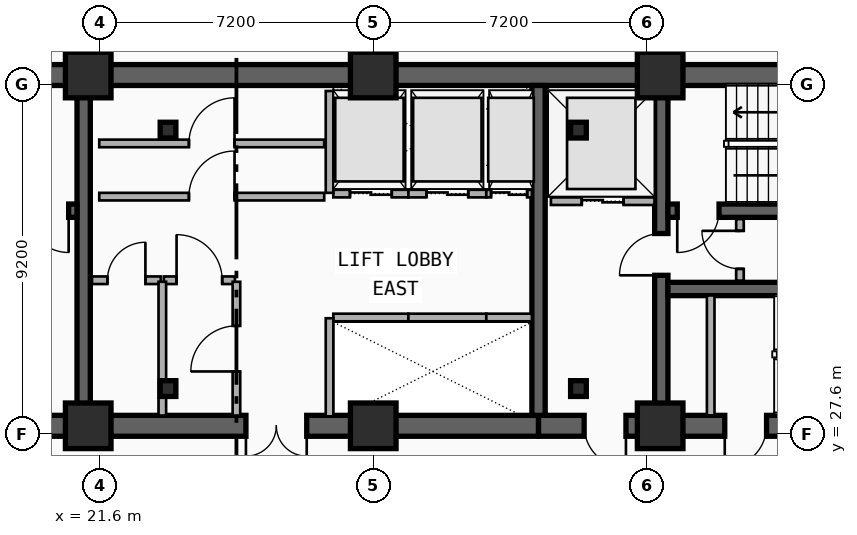
"""IFC4 building model, lengths in metres.
Left out: names, types, materials, properties, quantities, classifications, styles, units other than length and angle.
Written with IfcOpenShell. Run it as: python <this file> out.ifc"""

import sys

from ifc_helpers import new_model, si_unit, direction, frame, frame_2d, origin, origin_2d, place, context, subcontext, project, spatial, rectangle, i_section, extrude, element, fill, save


model = new_model("IFC4")
c1 = context("Model", 3, precision=1e-05, world=origin(), true_north=direction((0.0, 1.0)))
c2 = subcontext(c1, "Body", "Model", "MODEL_VIEW")
j1 = project(units=[si_unit("LENGTHUNIT", "METRE"), si_unit("PLANEANGLEUNIT", "RADIAN")], contexts=[c1])
p1 = place(None, origin())
s1 = spatial("IfcSite", under=j1, at=p1, CompositionType="ELEMENT")
p2 = place(p1, origin())
s2 = spatial("IfcBuilding", under=s1, at=p2, CompositionType="ELEMENT")
p3 = place(p2, frame((0.0, 0.0, 162.55)))
s3 = spatial("IfcBuildingStorey", under=s2, at=p3, CompositionType="ELEMENT", Elevation=162.55)
p4 = place(p3, frame((12.15, 37.05, 0.0), z_axis=(0.0, 0.0, 1.0), x_axis=(1.0, 0.0, 0.0)))
e1 = element("IfcWall", 1, at=p4, inside=s3, PredefinedType="SHEAR", context=c2, shape_type="SweptSolid", body=[
    extrude(rectangle(XDim=33.23, YDim=0.55, at=frame_2d((16.615, 0.0))), origin(), (0.0, 0.0, 1.0), 3.55),
])
p5 = place(p3, frame((21.18, 27.82, 0.0), z_axis=(0.0, 0.0, 1.0), x_axis=(-1.0, 0.0, 0.0)))
e2 = element("IfcWall", 2, at=p5, inside=s3, PredefinedType="SHEAR", context=c2, shape_type="SweptSolid", body=[
    extrude(rectangle(XDim=9.03, YDim=0.55, at=frame_2d((4.515, 0.0))), origin(), (0.0, 0.0, 1.0), 3.55),
])
p6 = place(p5, frame((2.68, 0.0, 0.0)))
e3 = element("IfcOpeningElement", 3, at=p6, cuts=e2, PredefinedType="OPENING", context=c2, shape_type="SweptSolid", body=[
    extrude(rectangle(XDim=1.1, YDim=2.15, at=frame_2d((0.55, 1.075))), frame((0.0, 0.285, 0.0), z_axis=(0.0, -1.0, 0.0), x_axis=(1.0, 0.0, 0.0)), (0.0, 0.0, 1.0), 0.57),
])
p7 = place(p3, frame((33.15, 27.82, 0.0), z_axis=(0.0, 0.0, 1.0), x_axis=(-1.0, 0.0, 0.0)))
e4 = element("IfcWall", 4, at=p7, inside=s3, PredefinedType="SHEAR", context=c2, shape_type="SweptSolid", body=[
    extrude(rectangle(XDim=11.97, YDim=0.55, at=frame_2d((5.985, 0.0))), origin(), (0.0, 0.0, 1.0), 3.55),
])
p8 = place(p7, frame((6.1, 0.0, 0.0)))
e5 = element("IfcOpeningElement", 5, at=p8, cuts=e4, PredefinedType="OPENING", context=c2, shape_type="SweptSolid", body=[
    extrude(rectangle(XDim=1.6, YDim=2.2, at=frame_2d((0.8, 1.1))), frame((0.0, 0.285, 0.0), z_axis=(0.0, -1.0, 0.0), x_axis=(1.0, 0.0, 0.0)), (0.0, 0.0, 1.0), 0.57),
])
p9 = place(p3, frame((45.38, 27.82, 0.0), z_axis=(0.0, 0.0, 1.0), x_axis=(-1.0, 0.0, 0.0)))
e6 = element("IfcWall", 6, at=p9, inside=s3, PredefinedType="SHEAR", context=c2, shape_type="SweptSolid", body=[
    extrude(rectangle(XDim=12.23, YDim=0.55, at=frame_2d((6.115, 0.0))), origin(), (0.0, 0.0, 1.0), 3.55),
])
p10 = place(p9, frame((9.93, 0.0, 0.0)))
e7 = element("IfcOpeningElement", 7, at=p10, cuts=e6, PredefinedType="OPENING", context=c2, shape_type="SweptSolid", body=[
    extrude(rectangle(XDim=1.1, YDim=2.15, at=frame_2d((0.55, 1.075))), frame((0.0, 0.285, 0.0), z_axis=(0.0, -1.0, 0.0), x_axis=(1.0, 0.0, 0.0)), (0.0, 0.0, 1.0), 0.57),
])
p11 = place(p9, frame((6.23, 0.0, 0.0)))
e8 = element("IfcOpeningElement", 8, at=p11, cuts=e6, PredefinedType="OPENING", context=c2, shape_type="SweptSolid", body=[
    extrude(rectangle(XDim=1.1, YDim=2.15, at=frame_2d((0.55, 1.075))), frame((0.0, 0.285, 0.0), z_axis=(0.0, -1.0, 0.0), x_axis=(1.0, 0.0, 0.0)), (0.0, 0.0, 1.0), 0.57),
])
for number, where, z_axis, x_axis in (
    (9, (21.18, 28.095, 0.0), (0.0, 0.0, 1.0), (0.0, 1.0, 0.0)),
    (10, (33.15, 28.095, 0.0), (0.0, 0.0, 1.0), (0.0, 1.0, 0.0)),
):
    element("IfcWall", number, at=place(p3, frame(where, z_axis=z_axis, x_axis=x_axis)), inside=s3, PredefinedType="SHEAR", context=c2, shape_type="SweptSolid", body=[
        extrude(rectangle(XDim=8.68, YDim=0.35, at=frame_2d((4.34, 0.0))), origin(), (0.0, 0.0, 1.0), 3.55),
    ])
p12 = place(p3, frame((36.38, 28.095, 0.0), z_axis=(0.0, 0.0, 1.0), x_axis=(0.0, 1.0, 0.0)))
e11 = element("IfcWall", 11, at=p12, inside=s3, PredefinedType="SHEAR", context=c2, shape_type="SweptSolid", body=[
    extrude(rectangle(XDim=8.68, YDim=0.35, at=frame_2d((4.34, 0.0))), origin(), (0.0, 0.0, 1.0), 3.55),
])
p13 = place(p12, frame((3.685, 0.0, 0.0)))
e12 = element("IfcOpeningElement", 12, at=p13, cuts=e11, PredefinedType="OPENING", context=c2, shape_type="SweptSolid", body=[
    extrude(rectangle(XDim=1.1, YDim=2.15, at=frame_2d((0.55, 1.075))), frame((0.0, 0.185, 0.0), z_axis=(0.0, -1.0, 0.0), x_axis=(1.0, 0.0, 0.0)), (0.0, 0.0, 1.0), 0.37),
])
p14 = place(p3, frame((21.005, 33.48, 0.0), z_axis=(0.0, 0.0, 1.0), x_axis=(-1.0, 0.0, 0.0)))
e13 = element("IfcWall", 13, at=p14, inside=s3, PredefinedType="SHEAR", context=c2, shape_type="SweptSolid", body=[
    extrude(rectangle(XDim=8.58, YDim=0.35, at=frame_2d((4.29, 0.0))), origin(), (0.0, 0.0, 1.0), 3.55),
])
p15 = place(p14, frame((0.22, 0.0, 0.0)))
e14 = element("IfcOpeningElement", 14, at=p15, cuts=e13, PredefinedType="OPENING", context=c2, shape_type="SweptSolid", body=[
    extrude(rectangle(XDim=1.1, YDim=2.15, at=frame_2d((0.55, 1.075))), frame((0.0, 0.185, 0.0), z_axis=(0.0, -1.0, 0.0), x_axis=(1.0, 0.0, 0.0)), (0.0, 0.0, 1.0), 0.37),
])
p16 = place(p3, frame((45.105, 33.48, 0.0), z_axis=(0.0, 0.0, 1.0), x_axis=(-1.0, 0.0, 0.0)))
e15 = element("IfcWall", 15, at=p16, inside=s3, PredefinedType="SHEAR", context=c2, shape_type="SweptSolid", body=[
    extrude(rectangle(XDim=8.55, YDim=0.35, at=frame_2d((4.275, 0.0))), origin(), (0.0, 0.0, 1.0), 3.55),
])
p17 = place(p16, frame((7.205, 0.0, 0.0)))
e16 = element("IfcOpeningElement", 16, at=p17, cuts=e15, PredefinedType="OPENING", context=c2, shape_type="SweptSolid", body=[
    extrude(rectangle(XDim=1.1, YDim=2.15, at=frame_2d((0.55, 1.075))), frame((0.0, 0.185, 0.0), z_axis=(0.0, -1.0, 0.0), x_axis=(1.0, 0.0, 0.0)), (0.0, 0.0, 1.0), 0.37),
])
p18 = place(p3, frame((36.555, 31.42, 0.0), z_axis=(0.0, 0.0, 1.0), x_axis=(1.0, 0.0, 0.0)))
e17 = element("IfcWall", 17, at=p18, inside=s3, PredefinedType="SHEAR", context=c2, shape_type="SweptSolid", body=[
    extrude(rectangle(XDim=8.55, YDim=0.35, at=frame_2d((4.275, 0.0))), origin(), (0.0, 0.0, 1.0), 3.55),
])
for number, where, z_axis, x_axis in (
    (18, (23.4, 28.8, 0.0), (0.0, 0.0, 1.0), (1.0, 0.0, 0.0)),
    (19, (34.2, 28.8, 0.0), (0.0, 0.0, 1.0), (1.0, 0.0, 0.0)),
    (20, (34.2, 35.6, 0.0), (0.0, 0.0, 1.0), (1.0, 0.0, 0.0)),
    (21, (23.4, 35.6, 0.0), (0.0, 0.0, 1.0), (1.0, 0.0, 0.0)),
):
    element("IfcColumn", number, at=place(p3, frame(where, z_axis=z_axis, x_axis=x_axis)), inside=s3, PredefinedType="COLUMN", context=c2, shape_type="SweptSolid", body=[
        extrude(i_section(OverallWidth=0.413, OverallDepth=0.415, WebThickness=0.03, FlangeThickness=0.047, FilletRadius=0.015, at=origin_2d()), origin(), (0.0, 0.0, 1.0), 3.55),
    ])
for number, where, z_axis, x_axis in (
    (22, (21.3, 27.82, 0.0), (0.0, 0.0, 1.0), (1.0, 0.0, 0.0)),
    (23, (21.3, 37.05, 0.0), (0.0, 0.0, 1.0), (1.0, 0.0, 0.0)),
    (24, (28.8, 27.82, 0.0), (0.0, 0.0, 1.0), (1.0, 0.0, 0.0)),
    (25, (28.8, 37.05, 0.0), (0.0, 0.0, 1.0), (1.0, 0.0, 0.0)),
    (26, (36.35, 27.82, 0.0), (0.0, 0.0, 1.0), (1.0, 0.0, 0.0)),
    (27, (36.35, 37.05, 0.0), (0.0, 0.0, 1.0), (1.0, 0.0, 0.0)),
):
    element("IfcColumn", number, at=place(p3, frame(where, z_axis=z_axis, x_axis=x_axis)), inside=s3, PredefinedType="COLUMN", context=c2, shape_type="SweptSolid", body=[
        extrude(rectangle(XDim=1.2, YDim=1.2, at=origin_2d()), origin(), (0.0, 0.0, 1.0), 3.55),
    ])
p19 = place(p3, frame((33.475, 33.73, 0.0), z_axis=(0.0, 0.0, 1.0), x_axis=(1.0, 0.0, 0.0)))
e28 = element("IfcWall", 28, at=p19, inside=s3, PredefinedType="PARTITIONING", context=c2, shape_type="SweptSolid", body=[
    extrude(rectangle(XDim=2.725, YDim=0.2, at=frame_2d((1.362, 0.0))), origin(), (0.0, 0.0, 1.0), 2.36),
])
p20 = place(p19, frame((0.812, 0.0, 0.0)))
e29 = element("IfcOpeningElement", 29, at=p20, cuts=e28, PredefinedType="OPENING", context=c2, shape_type="SweptSolid", body=[
    extrude(rectangle(XDim=1.1, YDim=2.15, at=frame_2d((0.55, 1.075))), frame((0.0, 0.11, 0.0), z_axis=(0.0, -1.0, 0.0), x_axis=(1.0, 0.0, 0.0)), (0.0, 0.0, 1.0), 0.22),
])
p21 = place(p3, frame((27.75, 30.67, 0.0), z_axis=(0.0, 0.0, 1.0), x_axis=(1.0, 0.0, 0.0)))
e30 = element("IfcWall", 30, at=p21, inside=s3, PredefinedType="PARTITIONING", context=c2, shape_type="SweptSolid", body=[
    extrude(rectangle(XDim=1.975, YDim=0.2, at=frame_2d((0.988, 0.0))), origin(), (0.0, 0.0, 1.0), 2.36),
])
p22 = place(p3, frame((27.65, 28.07, 0.0), z_axis=(0.0, 0.0, 1.0), x_axis=(0.0, 1.0, 0.0)))
e31 = element("IfcWall", 31, at=p22, inside=s3, PredefinedType="PARTITIONING", context=c2, shape_type="SweptSolid", body=[
    extrude(rectangle(XDim=2.58, YDim=0.2, at=frame_2d((1.29, 0.0))), origin(), (0.0, 0.0, 1.0), 2.36),
])
p23 = place(p3, frame((29.725, 30.67, 0.0), z_axis=(0.0, 0.0, 1.0), x_axis=(1.0, 0.0, 0.0)))
e32 = element("IfcWall", 32, at=p23, inside=s3, PredefinedType="PARTITIONING", context=c2, shape_type="SweptSolid", body=[
    extrude(rectangle(XDim=2.05, YDim=0.2, at=frame_2d((1.025, 0.0))), origin(), (0.0, 0.0, 1.0), 2.67),
])
p24 = place(p3, frame((31.775, 30.67, 0.0), z_axis=(0.0, 0.0, 1.0), x_axis=(1.0, 0.0, 0.0)))
e33 = element("IfcWall", 33, at=p24, inside=s3, PredefinedType="PARTITIONING", context=c2, shape_type="SweptSolid", body=[
    extrude(rectangle(XDim=1.2, YDim=0.2, at=frame_2d((0.6, 0.0))), origin(), (0.0, 0.0, 1.0), 2.67),
])
p25 = place(p3, frame((27.75, 33.93, 0.0), z_axis=(0.0, 0.0, 1.0), x_axis=(1.0, 0.0, 0.0)))
e34 = element("IfcWall", 34, at=p25, inside=s3, PredefinedType="PARTITIONING", context=c2, shape_type="SweptSolid", body=[
    extrude(rectangle(XDim=1.975, YDim=0.2, at=frame_2d((0.988, 0.0))), origin(), (0.0, 0.0, 1.0), 2.36),
])
p26 = place(p25, frame((0.438, 0.0, 0.0)))
e35 = element("IfcOpeningElement", 35, at=p26, cuts=e34, PredefinedType="OPENING", context=c2, shape_type="SweptSolid", body=[
    extrude(rectangle(XDim=1.1, YDim=2.15, at=frame_2d((0.55, 1.075))), frame((0.0, 0.11, 0.0), z_axis=(0.0, -1.0, 0.0), x_axis=(1.0, 0.0, 0.0)), (0.0, 0.0, 1.0), 0.22),
])
p27 = place(p3, frame((27.65, 33.95, 0.0), z_axis=(0.0, 0.0, 1.0), x_axis=(0.0, 1.0, 0.0)))
e36 = element("IfcWall", 36, at=p27, inside=s3, PredefinedType="PARTITIONING", context=c2, shape_type="SweptSolid", body=[
    extrude(rectangle(XDim=2.68, YDim=0.2, at=frame_2d((1.34, 0.0))), origin(), (0.0, 0.0, 1.0), 2.36),
])
p28 = place(p3, frame((29.725, 33.93, 0.0), z_axis=(0.0, 0.0, 1.0), x_axis=(1.0, 0.0, 0.0)))
e37 = element("IfcWall", 37, at=p28, inside=s3, PredefinedType="PARTITIONING", context=c2, shape_type="SweptSolid", body=[
    extrude(rectangle(XDim=2.05, YDim=0.2, at=frame_2d((1.025, 0.0))), origin(), (0.0, 0.0, 1.0), 3.29),
])
p29 = place(p28, frame((0.475, 0.0, 0.0)))
e38 = element("IfcOpeningElement", 38, at=p29, cuts=e37, PredefinedType="OPENING", context=c2, shape_type="SweptSolid", body=[
    extrude(rectangle(XDim=1.1, YDim=2.15, at=frame_2d((0.55, 1.075))), frame((0.0, 0.11, 0.0), z_axis=(0.0, -1.0, 0.0), x_axis=(1.0, 0.0, 0.0)), (0.0, 0.0, 1.0), 0.22),
])
p30 = place(p3, frame((31.775, 33.93, 0.0), z_axis=(0.0, 0.0, 1.0), x_axis=(1.0, 0.0, 0.0)))
e39 = element("IfcWall", 39, at=p30, inside=s3, PredefinedType="PARTITIONING", context=c2, shape_type="SweptSolid", body=[
    extrude(rectangle(XDim=1.2, YDim=0.2, at=frame_2d((0.6, 0.0))), origin(), (0.0, 0.0, 1.0), 3.29),
])
p31 = place(p30, frame((0.125, 0.0, 0.0)))
e40 = element("IfcOpeningElement", 40, at=p31, cuts=e39, PredefinedType="OPENING", context=c2, shape_type="SweptSolid", body=[
    extrude(rectangle(XDim=0.95, YDim=2.15, at=frame_2d((0.475, 1.075))), frame((0.0, 0.11, 0.0), z_axis=(0.0, -1.0, 0.0), x_axis=(1.0, 0.0, 0.0)), (0.0, 0.0, 1.0), 0.22),
])
p32 = place(p3, frame((37.68, 28.095, 0.0), z_axis=(0.0, 0.0, 1.0), x_axis=(0.0, 1.0, 0.0)))
e41 = element("IfcWall", 41, at=p32, inside=s3, PredefinedType="PARTITIONING", context=c2, shape_type="SweptSolid", body=[
    extrude(rectangle(XDim=3.155, YDim=0.2, at=frame_2d((1.578, 0.0))), origin(), (0.0, 0.0, 1.0), 2.67),
])
p33 = place(p3, frame((38.45, 31.64, 0.0), z_axis=(0.0, 0.0, 1.0), x_axis=(0.0, 1.0, 0.0)))
e42 = element("IfcWall", 42, at=p33, inside=s3, PredefinedType="PARTITIONING", context=c2, shape_type="SweptSolid", body=[
    extrude(rectangle(XDim=1.62, YDim=0.2, at=frame_2d((0.81, 0.0))), origin(), (0.0, 0.0, 1.0), 3.29),
])
p34 = place(p33, frame((0.31, 0.0, 0.0)))
e43 = element("IfcOpeningElement", 43, at=p34, cuts=e42, PredefinedType="OPENING", context=c2, shape_type="SweptSolid", body=[
    extrude(rectangle(XDim=1.0, YDim=2.15, at=frame_2d((0.5, 1.075))), frame((0.0, 0.11, 0.0), z_axis=(0.0, -1.0, 0.0), x_axis=(1.0, 0.0, 0.0)), (0.0, 0.0, 1.0), 0.22),
])
p35 = place(p3, frame((21.4, 31.65, 0.0), z_axis=(0.0, 0.0, 1.0), x_axis=(1.0, 0.0, 0.0)))
e44 = element("IfcWall", 44, at=p35, inside=s3, PredefinedType="PARTITIONING", context=c2, shape_type="SweptSolid", body=[
    extrude(rectangle(XDim=1.81, YDim=0.2, at=frame_2d((0.905, 0.0))), origin(), (0.0, 0.0, 1.0), 2.36),
])
p36 = place(p35, frame((0.405, 0.0, 0.0)))
e45 = element("IfcOpeningElement", 45, at=p36, cuts=e44, PredefinedType="OPENING", context=c2, shape_type="SweptSolid", body=[
    extrude(rectangle(XDim=1.0, YDim=2.15, at=frame_2d((0.5, 1.075))), frame((0.0, 0.11, 0.0), z_axis=(0.0, -1.0, 0.0), x_axis=(1.0, 0.0, 0.0)), (0.0, 0.0, 1.0), 0.22),
])
p37 = place(p3, frame((23.29, 31.65, 0.0), z_axis=(0.0, 0.0, 1.0), x_axis=(1.0, 0.0, 0.0)))
e46 = element("IfcWall", 46, at=p37, inside=s3, PredefinedType="PARTITIONING", context=c2, shape_type="SweptSolid", body=[
    extrude(rectangle(XDim=1.87, YDim=0.2, at=frame_2d((0.935, 0.0))), origin(), (0.0, 0.0, 1.0), 3.29),
])
p38 = place(p37, frame((0.335, 0.0, 0.0)))
e47 = element("IfcOpeningElement", 47, at=p38, cuts=e46, PredefinedType="OPENING", context=c2, shape_type="SweptSolid", body=[
    extrude(rectangle(XDim=1.2, YDim=2.15, at=frame_2d((0.6, 1.075))), frame((0.0, 0.11, 0.0), z_axis=(0.0, -1.0, 0.0), x_axis=(1.0, 0.0, 0.0)), (0.0, 0.0, 1.0), 0.22),
])
p39 = place(p3, frame((21.59, 33.85, 0.0), z_axis=(0.0, 0.0, 1.0), x_axis=(1.0, 0.0, 0.0)))
e48 = element("IfcWall", 48, at=p39, inside=s3, PredefinedType="PARTITIONING", context=c2, shape_type="SweptSolid", body=[
    extrude(rectangle(XDim=5.92, YDim=0.2, at=frame_2d((2.96, 0.0))), origin(), (0.0, 0.0, 1.0), 2.36),
])
p40 = place(p39, frame((2.36, 0.0, 0.0)))
e49 = element("IfcOpeningElement", 49, at=p40, cuts=e48, PredefinedType="OPENING", context=c2, shape_type="SweptSolid", body=[
    extrude(rectangle(XDim=1.2, YDim=2.15, at=frame_2d((0.6, 1.075))), frame((0.0, 0.11, 0.0), z_axis=(0.0, -1.0, 0.0), x_axis=(1.0, 0.0, 0.0)), (0.0, 0.0, 1.0), 0.22),
])
p41 = place(p3, frame((25.2, 28.09, 0.0), z_axis=(0.0, 0.0, 1.0), x_axis=(0.0, 1.0, 0.0)))
e50 = element("IfcWall", 50, at=p41, inside=s3, PredefinedType="PARTITIONING", context=c2, shape_type="SweptSolid", body=[
    extrude(rectangle(XDim=3.52, YDim=0.2, at=frame_2d((1.76, 0.0))), origin(), (0.0, 0.0, 1.0), 2.67),
])
p42 = place(p41, frame((1.16, 0.0, 0.0)))
e51 = element("IfcOpeningElement", 51, at=p42, cuts=e50, PredefinedType="OPENING", context=c2, shape_type="SweptSolid", body=[
    extrude(rectangle(XDim=1.2, YDim=2.15, at=frame_2d((0.6, 1.075))), frame((0.0, 0.11, 0.0), z_axis=(0.0, -1.0, 0.0), x_axis=(1.0, 0.0, 0.0)), (0.0, 0.0, 1.0), 0.22),
])
p43 = place(p3, frame((23.25, 28.09, 0.0), z_axis=(0.0, 0.0, 1.0), x_axis=(0.0, 1.0, 0.0)))
e52 = element("IfcWall", 52, at=p43, inside=s3, PredefinedType="PARTITIONING", context=c2, shape_type="SweptSolid", body=[
    extrude(rectangle(XDim=3.52, YDim=0.2, at=frame_2d((1.76, 0.0))), origin(), (0.0, 0.0, 1.0), 2.67),
])
p44 = place(p3, frame((21.59, 35.25, 0.0), z_axis=(0.0, 0.0, 1.0), x_axis=(1.0, 0.0, 0.0)))
e53 = element("IfcWall", 53, at=p44, inside=s3, PredefinedType="PARTITIONING", context=c2, shape_type="SweptSolid", body=[
    extrude(rectangle(XDim=5.92, YDim=0.2, at=frame_2d((2.96, 0.0))), origin(), (0.0, 0.0, 1.0), 2.36),
])
p45 = place(p44, frame((2.36, 0.0, 0.0)))
e54 = element("IfcOpeningElement", 54, at=p45, cuts=e53, PredefinedType="OPENING", context=c2, shape_type="SweptSolid", body=[
    extrude(rectangle(XDim=1.2, YDim=2.15, at=frame_2d((0.6, 1.075))), frame((0.0, 0.11, 0.0), z_axis=(0.0, -1.0, 0.0), x_axis=(1.0, 0.0, 0.0)), (0.0, 0.0, 1.0), 0.22),
])
p46 = place(p20, origin())
e55 = element("IfcDoor", 55, at=p46, inside=s3, OperationType="DOUBLE_DOOR_SLIDING", PredefinedType="DOOR", context=c2, shape_type="SweptSolid", body=[
    extrude(rectangle(XDim=1.1, YDim=2.15, at=frame_2d((0.55, 1.075))), frame((0.0, 0.025, 0.0), z_axis=(0.0, -1.0, 0.0), x_axis=(1.0, 0.0, 0.0)), (0.0, 0.0, 1.0), 0.05),
])
fill(e29, e55)
p47 = place(p26, origin())
e56 = element("IfcDoor", 56, at=p47, inside=s3, OperationType="DOUBLE_DOOR_SLIDING", PredefinedType="DOOR", context=c2, shape_type="SweptSolid", body=[
    extrude(rectangle(XDim=1.1, YDim=2.15, at=frame_2d((0.55, 1.075))), frame((0.0, 0.025, 0.0), z_axis=(0.0, -1.0, 0.0), x_axis=(1.0, 0.0, 0.0)), (0.0, 0.0, 1.0), 0.05),
])
fill(e35, e56)
p48 = place(p29, origin())
e57 = element("IfcDoor", 57, at=p48, inside=s3, OperationType="DOUBLE_DOOR_SLIDING", PredefinedType="DOOR", context=c2, shape_type="SweptSolid", body=[
    extrude(rectangle(XDim=1.1, YDim=2.15, at=frame_2d((0.55, 1.075))), frame((0.0, 0.025, 0.0), z_axis=(0.0, -1.0, 0.0), x_axis=(1.0, 0.0, 0.0)), (0.0, 0.0, 1.0), 0.05),
])
fill(e38, e57)
p49 = place(p31, origin())
e58 = element("IfcDoor", 58, at=p49, inside=s3, OperationType="DOUBLE_DOOR_SLIDING", PredefinedType="DOOR", context=c2, shape_type="SweptSolid", body=[
    extrude(rectangle(XDim=0.95, YDim=2.15, at=frame_2d((0.475, 1.075))), frame((0.0, 0.025, 0.0), z_axis=(0.0, -1.0, 0.0), x_axis=(1.0, 0.0, 0.0)), (0.0, 0.0, 1.0), 0.05),
])
fill(e40, e58)
p50 = place(p15, origin())
e59 = element("IfcDoor", 59, at=p50, inside=s3, OperationType="SINGLE_SWING_LEFT", PredefinedType="DOOR", context=c2, shape_type="SweptSolid", body=[
    extrude(rectangle(XDim=1.1, YDim=2.15, at=frame_2d((0.55, 1.075))), frame((0.0, 0.025, 0.0), z_axis=(0.0, -1.0, 0.0), x_axis=(1.0, 0.0, 0.0)), (0.0, 0.0, 1.0), 0.05),
])
fill(e14, e59)
p51 = place(p17, origin())
e60 = element("IfcDoor", 60, at=p51, inside=s3, OperationType="SINGLE_SWING_RIGHT", PredefinedType="DOOR", context=c2, shape_type="SweptSolid", body=[
    extrude(rectangle(XDim=1.1, YDim=2.15, at=frame_2d((0.55, 1.075))), frame((0.0, 0.025, 0.0), z_axis=(0.0, -1.0, 0.0), x_axis=(1.0, 0.0, 0.0)), (0.0, 0.0, 1.0), 0.05),
])
fill(e16, e60)
p52 = place(p13, origin())
e61 = element("IfcDoor", 61, at=p52, inside=s3, OperationType="SINGLE_SWING_LEFT", PredefinedType="DOOR", context=c2, shape_type="SweptSolid", body=[
    extrude(rectangle(XDim=1.1, YDim=2.15, at=frame_2d((0.55, 1.075))), frame((0.0, 0.025, 0.0), z_axis=(0.0, -1.0, 0.0), x_axis=(1.0, 0.0, 0.0)), (0.0, 0.0, 1.0), 0.05),
])
fill(e12, e61)
p53 = place(p10, origin())
e62 = element("IfcDoor", 62, at=p53, inside=s3, OperationType="SINGLE_SWING_LEFT", PredefinedType="DOOR", context=c2, shape_type="SweptSolid", body=[
    extrude(rectangle(XDim=1.1, YDim=2.15, at=frame_2d((0.55, 1.075))), frame((0.0, 0.025, 0.0), z_axis=(0.0, -1.0, 0.0), x_axis=(1.0, 0.0, 0.0)), (0.0, 0.0, 1.0), 0.05),
])
fill(e7, e62)
p54 = place(p11, origin())
e63 = element("IfcDoor", 63, at=p54, inside=s3, OperationType="SINGLE_SWING_RIGHT", PredefinedType="DOOR", context=c2, shape_type="SweptSolid", body=[
    extrude(rectangle(XDim=1.1, YDim=2.15, at=frame_2d((0.55, 1.075))), frame((0.0, 0.025, 0.0), z_axis=(0.0, -1.0, 0.0), x_axis=(1.0, 0.0, 0.0)), (0.0, 0.0, 1.0), 0.05),
])
fill(e8, e63)
p55 = place(p8, origin())
e64 = element("IfcDoor", 64, at=p55, inside=s3, OperationType="SINGLE_SWING_LEFT", PredefinedType="DOOR", context=c2, shape_type="SweptSolid", body=[
    extrude(rectangle(XDim=1.6, YDim=2.2, at=frame_2d((0.8, 1.1))), frame((0.0, 0.025, 0.0), z_axis=(0.0, -1.0, 0.0), x_axis=(1.0, 0.0, 0.0)), (0.0, 0.0, 1.0), 0.05),
])
fill(e5, e64)
p56 = place(p34, origin())
e65 = element("IfcDoor", 65, at=p56, inside=s3, OperationType="SINGLE_SWING_RIGHT", PredefinedType="DOOR", context=c2, shape_type="SweptSolid", body=[
    extrude(rectangle(XDim=1.0, YDim=2.15, at=frame_2d((0.5, 1.075))), frame((0.0, 0.025, 0.0), z_axis=(0.0, -1.0, 0.0), x_axis=(1.0, 0.0, 0.0)), (0.0, 0.0, 1.0), 0.05),
])
fill(e43, e65)
p57 = place(p36, origin())
e66 = element("IfcDoor", 66, at=p57, inside=s3, OperationType="SINGLE_SWING_RIGHT", PredefinedType="DOOR", context=c2, shape_type="SweptSolid", body=[
    extrude(rectangle(XDim=1.0, YDim=2.15, at=frame_2d((0.5, 1.075))), frame((0.0, 0.025, 0.0), z_axis=(0.0, -1.0, 0.0), x_axis=(1.0, 0.0, 0.0)), (0.0, 0.0, 1.0), 0.05),
])
fill(e45, e66)
p58 = place(p38, origin())
e67 = element("IfcDoor", 67, at=p58, inside=s3, OperationType="SINGLE_SWING_LEFT", PredefinedType="DOOR", context=c2, shape_type="SweptSolid", body=[
    extrude(rectangle(XDim=1.2, YDim=2.15, at=frame_2d((0.6, 1.075))), frame((0.0, 0.025, 0.0), z_axis=(0.0, -1.0, 0.0), x_axis=(1.0, 0.0, 0.0)), (0.0, 0.0, 1.0), 0.05),
])
fill(e47, e67)
p59 = place(p40, origin())
e68 = element("IfcDoor", 68, at=p59, inside=s3, OperationType="SINGLE_SWING_RIGHT", PredefinedType="DOOR", context=c2, shape_type="SweptSolid", body=[
    extrude(rectangle(XDim=1.2, YDim=2.15, at=frame_2d((0.6, 1.075))), frame((0.0, 0.025, 0.0), z_axis=(0.0, -1.0, 0.0), x_axis=(1.0, 0.0, 0.0)), (0.0, 0.0, 1.0), 0.05),
])
fill(e49, e68)
p60 = place(p42, origin())
e69 = element("IfcDoor", 69, at=p60, inside=s3, OperationType="SINGLE_SWING_LEFT", PredefinedType="DOOR", context=c2, shape_type="SweptSolid", body=[
    extrude(rectangle(XDim=1.2, YDim=2.15, at=frame_2d((0.6, 1.075))), frame((0.0, 0.025, 0.0), z_axis=(0.0, -1.0, 0.0), x_axis=(1.0, 0.0, 0.0)), (0.0, 0.0, 1.0), 0.05),
])
fill(e51, e69)
p61 = place(p45, origin())
e70 = element("IfcDoor", 70, at=p61, inside=s3, OperationType="SINGLE_SWING_RIGHT", PredefinedType="DOOR", context=c2, shape_type="SweptSolid", body=[
    extrude(rectangle(XDim=1.2, YDim=2.15, at=frame_2d((0.6, 1.075))), frame((0.0, 0.025, 0.0), z_axis=(0.0, -1.0, 0.0), x_axis=(1.0, 0.0, 0.0)), (0.0, 0.0, 1.0), 0.05),
])
fill(e54, e70)
save(model, sys.argv[1])
